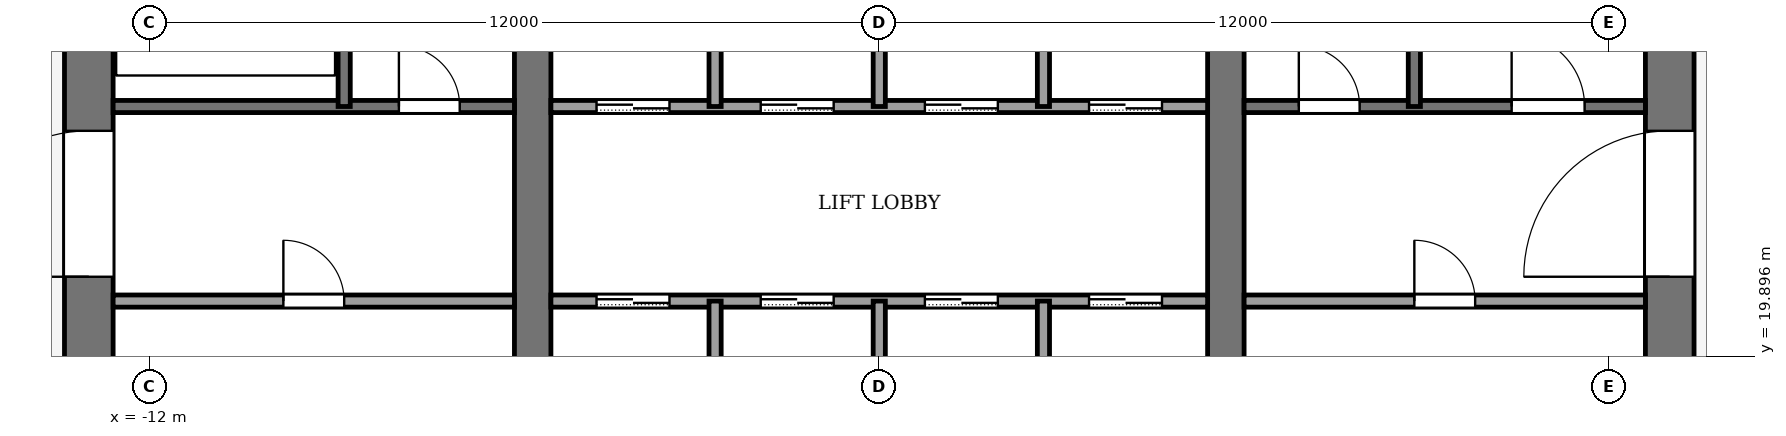
"""IFC4 building model, lengths in metres.
Left out: names, types, materials, properties, quantities, classifications, styles, units other than length and angle.
Written with IfcOpenShell. Run it as: python <this file> out.ifc"""

import sys

from ifc_helpers import new_model, si_unit, direction, frame, frame_2d, origin, place, context, subcontext, project, spatial, rectangle, extrude, element, fill, save


model = new_model("IFC4")
c1 = context("Model", 3, precision=1e-05, world=origin(), true_north=direction((0.0, 1.0)))
c2 = subcontext(c1, "Body", "Model", "MODEL_VIEW")
j1 = project(units=[si_unit("LENGTHUNIT", "METRE"), si_unit("PLANEANGLEUNIT", "RADIAN")], contexts=[c1])
p1 = place(None, origin())
s1 = spatial("IfcSite", under=j1, at=p1, CompositionType="ELEMENT")
p2 = place(p1, origin())
s2 = spatial("IfcBuilding", under=s1, at=p2, CompositionType="ELEMENT")
p3 = place(p2, frame((0.0, 0.0, 233.0)))
s3 = spatial("IfcBuildingStorey", under=s2, at=p3, CompositionType="ELEMENT", Elevation=233.0)
p4 = place(p3, frame((-13.0, 18.4, -0.13), z_axis=(0.0, 0.0, 1.0), x_axis=(0.0, 1.0, 0.0)))
e1 = element("IfcWall", 1, at=p4, inside=s3, PredefinedType="SHEAR", context=c2, shape_type="SweptSolid", body=[
    extrude(rectangle(XDim=19.2, YDim=0.8, at=frame_2d((9.6, 0.0))), origin(), (0.0, 0.0, 1.0), 5.0),
])
p5 = place(p4, frame((2.8, 0.0, 0.13)))
e2 = element("IfcOpeningElement", 2, at=p5, cuts=e1, PredefinedType="OPENING", context=c2, shape_type="SweptSolid", body=[
    extrude(rectangle(XDim=2.4, YDim=2.4, at=frame_2d((1.2, 1.2))), frame((0.0, 0.41, 0.0), z_axis=(0.0, -1.0, 0.0), x_axis=(1.0, 0.0, 0.0)), (0.0, 0.0, 1.0), 0.82),
])
p6 = place(p4, frame((13.4, 0.0, 0.13)))
e3 = element("IfcOpeningElement", 3, at=p6, cuts=e1, PredefinedType="OPENING", context=c2, shape_type="SweptSolid", body=[
    extrude(rectangle(XDim=1.4, YDim=2.2, at=frame_2d((0.7, 1.1))), frame((0.0, 0.41, 0.0), z_axis=(0.0, -1.0, 0.0), x_axis=(1.0, 0.0, 0.0)), (0.0, 0.0, 1.0), 0.82),
])
p7 = place(p3, frame((13.0, 18.4, -0.13), z_axis=(0.0, 0.0, 1.0), x_axis=(0.0, 1.0, 0.0)))
e4 = element("IfcWall", 4, at=p7, inside=s3, PredefinedType="SHEAR", context=c2, shape_type="SweptSolid", body=[
    extrude(rectangle(XDim=19.2, YDim=0.8, at=frame_2d((9.6, 0.0))), origin(), (0.0, 0.0, 1.0), 5.0),
])
p8 = place(p7, frame((2.8, 0.0, 0.13)))
e5 = element("IfcOpeningElement", 5, at=p8, cuts=e4, PredefinedType="OPENING", context=c2, shape_type="SweptSolid", body=[
    extrude(rectangle(XDim=2.4, YDim=2.4, at=frame_2d((1.2, 1.2))), frame((0.0, 0.41, 0.0), z_axis=(0.0, -1.0, 0.0), x_axis=(1.0, 0.0, 0.0)), (0.0, 0.0, 1.0), 0.82),
])
p9 = place(p7, frame((13.3, 0.0, 0.13)))
e6 = element("IfcOpeningElement", 6, at=p9, cuts=e4, PredefinedType="OPENING", context=c2, shape_type="SweptSolid", body=[
    extrude(rectangle(XDim=2.4, YDim=2.4, at=frame_2d((1.2, 1.2))), frame((0.0, 0.41, 0.0), z_axis=(0.0, -1.0, 0.0), x_axis=(1.0, 0.0, 0.0)), (0.0, 0.0, 1.0), 0.82),
])
p10 = place(p3, frame((-5.7, 18.4, -0.13), z_axis=(0.0, 0.0, 1.0), x_axis=(0.0, 1.0, 0.0)))
e7 = element("IfcWall", 7, at=p10, inside=s3, PredefinedType="SHEAR", context=c2, shape_type="SweptSolid", body=[
    extrude(rectangle(XDim=19.2, YDim=0.6, at=frame_2d((9.6, 0.0))), origin(), (0.0, 0.0, 1.0), 5.0),
])
p11 = place(p10, frame((8.35, 0.0, 0.13)))
e8 = element("IfcOpeningElement", 8, at=p11, cuts=e7, PredefinedType="OPENING", context=c2, shape_type="SweptSolid", body=[
    extrude(rectangle(XDim=0.9, YDim=2.1, at=frame_2d((0.45, 1.05))), frame((0.0, 0.31, 0.0), z_axis=(0.0, -1.0, 0.0), x_axis=(1.0, 0.0, 0.0)), (0.0, 0.0, 1.0), 0.62),
])
p12 = place(p3, frame((5.7, 18.4, -0.13), z_axis=(0.0, 0.0, 1.0), x_axis=(0.0, 1.0, 0.0)))
e9 = element("IfcWall", 9, at=p12, inside=s3, PredefinedType="SHEAR", context=c2, shape_type="SweptSolid", body=[
    extrude(rectangle(XDim=19.2, YDim=0.6, at=frame_2d((9.6, 0.0))), origin(), (0.0, 0.0, 1.0), 5.0),
])
p13 = place(p12, frame((13.3, 0.0, 0.13)))
e10 = element("IfcOpeningElement", 10, at=p13, cuts=e9, PredefinedType="OPENING", context=c2, shape_type="SweptSolid", body=[
    extrude(rectangle(XDim=2.4, YDim=2.4, at=frame_2d((1.2, 1.2))), frame((0.0, 0.31, 0.0), z_axis=(0.0, -1.0, 0.0), x_axis=(1.0, 0.0, 0.0)), (0.0, 0.0, 1.0), 0.62),
])
p14 = place(p3, frame((-12.6, 20.8, 0.0), z_axis=(0.0, 0.0, 1.0), x_axis=(1.0, 0.0, 0.0)))
e11 = element("IfcWall", 11, at=p14, inside=s3, PredefinedType="PARTITIONING", context=c2, shape_type="SweptSolid", body=[
    extrude(rectangle(XDim=6.6, YDim=0.2, at=frame_2d((3.3, 0.0))), origin(), (0.0, 0.0, 1.0), 4.87),
])
p15 = place(p14, frame((2.8, 0.0, 0.0)))
e12 = element("IfcOpeningElement", 12, at=p15, cuts=e11, PredefinedType="OPENING", context=c2, shape_type="SweptSolid", body=[
    extrude(rectangle(XDim=1.0, YDim=2.1, at=frame_2d((0.5, 1.05))), frame((0.0, 0.11, 0.0), z_axis=(0.0, -1.0, 0.0), x_axis=(1.0, 0.0, 0.0)), (0.0, 0.0, 1.0), 0.22),
])
p16 = place(p3, frame((-5.4, 20.8, 0.0), z_axis=(0.0, 0.0, 1.0), x_axis=(1.0, 0.0, 0.0)))
e13 = element("IfcWall", 13, at=p16, inside=s3, PredefinedType="PARTITIONING", context=c2, shape_type="SweptSolid", body=[
    extrude(rectangle(XDim=10.8, YDim=0.2, at=frame_2d((5.4, 0.0))), origin(), (0.0, 0.0, 1.0), 4.87),
])
p17 = place(p16, frame((0.75, 0.0, 0.0)))
e14 = element("IfcOpeningElement", 14, at=p17, cuts=e13, PredefinedType="OPENING", context=c2, shape_type="SweptSolid", body=[
    extrude(rectangle(XDim=1.2, YDim=2.2, at=frame_2d((0.6, 1.1))), frame((0.0, 0.11, 0.0), z_axis=(0.0, -1.0, 0.0), x_axis=(1.0, 0.0, 0.0)), (0.0, 0.0, 1.0), 0.22),
])
p18 = place(p16, frame((3.45, 0.0, 0.0)))
e15 = element("IfcOpeningElement", 15, at=p18, cuts=e13, PredefinedType="OPENING", context=c2, shape_type="SweptSolid", body=[
    extrude(rectangle(XDim=1.2, YDim=2.2, at=frame_2d((0.6, 1.1))), frame((0.0, 0.11, 0.0), z_axis=(0.0, -1.0, 0.0), x_axis=(1.0, 0.0, 0.0)), (0.0, 0.0, 1.0), 0.22),
])
p19 = place(p16, frame((6.15, 0.0, 0.0)))
e16 = element("IfcOpeningElement", 16, at=p19, cuts=e13, PredefinedType="OPENING", context=c2, shape_type="SweptSolid", body=[
    extrude(rectangle(XDim=1.2, YDim=2.2, at=frame_2d((0.6, 1.1))), frame((0.0, 0.11, 0.0), z_axis=(0.0, -1.0, 0.0), x_axis=(1.0, 0.0, 0.0)), (0.0, 0.0, 1.0), 0.22),
])
p20 = place(p16, frame((8.85, 0.0, 0.0)))
e17 = element("IfcOpeningElement", 17, at=p20, cuts=e13, PredefinedType="OPENING", context=c2, shape_type="SweptSolid", body=[
    extrude(rectangle(XDim=1.2, YDim=2.2, at=frame_2d((0.6, 1.1))), frame((0.0, 0.11, 0.0), z_axis=(0.0, -1.0, 0.0), x_axis=(1.0, 0.0, 0.0)), (0.0, 0.0, 1.0), 0.22),
])
p21 = place(p3, frame((6.0, 20.8, 0.0), z_axis=(0.0, 0.0, 1.0), x_axis=(1.0, 0.0, 0.0)))
e18 = element("IfcWall", 18, at=p21, inside=s3, PredefinedType="PARTITIONING", context=c2, shape_type="SweptSolid", body=[
    extrude(rectangle(XDim=6.6, YDim=0.2, at=frame_2d((3.3, 0.0))), origin(), (0.0, 0.0, 1.0), 4.87),
])
p22 = place(p21, frame((2.8, 0.0, 0.0)))
e19 = element("IfcOpeningElement", 19, at=p22, cuts=e18, PredefinedType="OPENING", context=c2, shape_type="SweptSolid", body=[
    extrude(rectangle(XDim=1.0, YDim=2.1, at=frame_2d((0.5, 1.05))), frame((0.0, 0.11, 0.0), z_axis=(0.0, -1.0, 0.0), x_axis=(1.0, 0.0, 0.0)), (0.0, 0.0, 1.0), 0.22),
])
p23 = place(p3, frame((-12.6, 24.0, 0.0), z_axis=(0.0, 0.0, 1.0), x_axis=(1.0, 0.0, 0.0)))
e20 = element("IfcWall", 20, at=p23, inside=s3, PredefinedType="PARTITIONING", context=c2, shape_type="SweptSolid", body=[
    extrude(rectangle(XDim=6.6, YDim=0.2, at=frame_2d((3.3, 0.0))), origin(), (0.0, 0.0, 1.0), 4.87),
])
p24 = place(p23, frame((4.7, 0.0, 0.0)))
e21 = element("IfcOpeningElement", 21, at=p24, cuts=e20, PredefinedType="OPENING", context=c2, shape_type="SweptSolid", body=[
    extrude(rectangle(XDim=1.0, YDim=2.1, at=frame_2d((0.5, 1.05))), frame((0.0, 0.11, 0.0), z_axis=(0.0, -1.0, 0.0), x_axis=(1.0, 0.0, 0.0)), (0.0, 0.0, 1.0), 0.22),
])
p25 = place(p3, frame((-5.4, 24.0, 0.0), z_axis=(0.0, 0.0, 1.0), x_axis=(1.0, 0.0, 0.0)))
e22 = element("IfcWall", 22, at=p25, inside=s3, PredefinedType="PARTITIONING", context=c2, shape_type="SweptSolid", body=[
    extrude(rectangle(XDim=10.8, YDim=0.2, at=frame_2d((5.4, 0.0))), origin(), (0.0, 0.0, 1.0), 4.87),
])
p26 = place(p25, frame((0.75, 0.0, 0.0)))
e23 = element("IfcOpeningElement", 23, at=p26, cuts=e22, PredefinedType="OPENING", context=c2, shape_type="SweptSolid", body=[
    extrude(rectangle(XDim=1.2, YDim=2.2, at=frame_2d((0.6, 1.1))), frame((0.0, 0.11, 0.0), z_axis=(0.0, -1.0, 0.0), x_axis=(1.0, 0.0, 0.0)), (0.0, 0.0, 1.0), 0.22),
])
p27 = place(p25, frame((3.45, 0.0, 0.0)))
e24 = element("IfcOpeningElement", 24, at=p27, cuts=e22, PredefinedType="OPENING", context=c2, shape_type="SweptSolid", body=[
    extrude(rectangle(XDim=1.2, YDim=2.2, at=frame_2d((0.6, 1.1))), frame((0.0, 0.11, 0.0), z_axis=(0.0, -1.0, 0.0), x_axis=(1.0, 0.0, 0.0)), (0.0, 0.0, 1.0), 0.22),
])
p28 = place(p25, frame((6.15, 0.0, 0.0)))
e25 = element("IfcOpeningElement", 25, at=p28, cuts=e22, PredefinedType="OPENING", context=c2, shape_type="SweptSolid", body=[
    extrude(rectangle(XDim=1.2, YDim=2.2, at=frame_2d((0.6, 1.1))), frame((0.0, 0.11, 0.0), z_axis=(0.0, -1.0, 0.0), x_axis=(1.0, 0.0, 0.0)), (0.0, 0.0, 1.0), 0.22),
])
p29 = place(p25, frame((8.85, 0.0, 0.0)))
e26 = element("IfcOpeningElement", 26, at=p29, cuts=e22, PredefinedType="OPENING", context=c2, shape_type="SweptSolid", body=[
    extrude(rectangle(XDim=1.2, YDim=2.2, at=frame_2d((0.6, 1.1))), frame((0.0, 0.11, 0.0), z_axis=(0.0, -1.0, 0.0), x_axis=(1.0, 0.0, 0.0)), (0.0, 0.0, 1.0), 0.22),
])
p30 = place(p3, frame((6.0, 24.0, 0.0), z_axis=(0.0, 0.0, 1.0), x_axis=(1.0, 0.0, 0.0)))
e27 = element("IfcWall", 27, at=p30, inside=s3, PredefinedType="PARTITIONING", context=c2, shape_type="SweptSolid", body=[
    extrude(rectangle(XDim=6.6, YDim=0.2, at=frame_2d((3.3, 0.0))), origin(), (0.0, 0.0, 1.0), 4.87),
])
p31 = place(p30, frame((0.9, 0.0, 0.0)))
e28 = element("IfcOpeningElement", 28, at=p31, cuts=e27, PredefinedType="OPENING", context=c2, shape_type="SweptSolid", body=[
    extrude(rectangle(XDim=1.0, YDim=2.1, at=frame_2d((0.5, 1.05))), frame((0.0, 0.11, 0.0), z_axis=(0.0, -1.0, 0.0), x_axis=(1.0, 0.0, 0.0)), (0.0, 0.0, 1.0), 0.22),
])
p32 = place(p30, frame((4.4, 0.0, 0.0)))
e29 = element("IfcOpeningElement", 29, at=p32, cuts=e27, PredefinedType="OPENING", context=c2, shape_type="SweptSolid", body=[
    extrude(rectangle(XDim=1.2, YDim=2.2, at=frame_2d((0.6, 1.1))), frame((0.0, 0.11, 0.0), z_axis=(0.0, -1.0, 0.0), x_axis=(1.0, 0.0, 0.0)), (0.0, 0.0, 1.0), 0.22),
])
p33 = place(p3, frame((-8.8, 24.0, 0.0), z_axis=(0.0, 0.0, 1.0), x_axis=(0.0, 1.0, 0.0)))
e30 = element("IfcWall", 30, at=p33, inside=s3, PredefinedType="PARTITIONING", context=c2, shape_type="SweptSolid", body=[
    extrude(rectangle(XDim=7.4, YDim=0.2, at=frame_2d((3.7, 0.0))), origin(), (0.0, 0.0, 1.0), 4.87),
])
p34 = place(p3, frame((-2.7, 18.4, 0.0), z_axis=(0.0, 0.0, 1.0), x_axis=(0.0, 1.0, 0.0)))
e31 = element("IfcWall", 31, at=p34, inside=s3, PredefinedType="PARTITIONING", context=c2, shape_type="SweptSolid", body=[
    extrude(rectangle(XDim=2.4, YDim=0.2, at=frame_2d((1.2, 0.0))), origin(), (0.0, 0.0, 1.0), 4.87),
])
p35 = place(p3, frame((-2.7, 24.0, 0.0), z_axis=(0.0, 0.0, 1.0), x_axis=(0.0, 1.0, 0.0)))
e32 = element("IfcWall", 32, at=p35, inside=s3, PredefinedType="PARTITIONING", context=c2, shape_type="SweptSolid", body=[
    extrude(rectangle(XDim=2.4, YDim=0.2, at=frame_2d((1.2, 0.0))), origin(), (0.0, 0.0, 1.0), 4.87),
])
p36 = place(p3, frame((0.0, 18.4, 0.0), z_axis=(0.0, 0.0, 1.0), x_axis=(0.0, 1.0, 0.0)))
e33 = element("IfcWall", 33, at=p36, inside=s3, PredefinedType="PARTITIONING", context=c2, shape_type="SweptSolid", body=[
    extrude(rectangle(XDim=2.4, YDim=0.2, at=frame_2d((1.2, 0.0))), origin(), (0.0, 0.0, 1.0), 4.87),
])
p37 = place(p3, frame((0.0, 24.0, 0.0), z_axis=(0.0, 0.0, 1.0), x_axis=(0.0, 1.0, 0.0)))
e34 = element("IfcWall", 34, at=p37, inside=s3, PredefinedType="PARTITIONING", context=c2, shape_type="SweptSolid", body=[
    extrude(rectangle(XDim=2.4, YDim=0.2, at=frame_2d((1.2, 0.0))), origin(), (0.0, 0.0, 1.0), 4.87),
])
p38 = place(p3, frame((2.7, 18.4, 0.0), z_axis=(0.0, 0.0, 1.0), x_axis=(0.0, 1.0, 0.0)))
e35 = element("IfcWall", 35, at=p38, inside=s3, PredefinedType="PARTITIONING", context=c2, shape_type="SweptSolid", body=[
    extrude(rectangle(XDim=2.4, YDim=0.2, at=frame_2d((1.2, 0.0))), origin(), (0.0, 0.0, 1.0), 4.87),
])
p39 = place(p3, frame((2.7, 24.0, 0.0), z_axis=(0.0, 0.0, 1.0), x_axis=(0.0, 1.0, 0.0)))
e36 = element("IfcWall", 36, at=p39, inside=s3, PredefinedType="PARTITIONING", context=c2, shape_type="SweptSolid", body=[
    extrude(rectangle(XDim=2.4, YDim=0.2, at=frame_2d((1.2, 0.0))), origin(), (0.0, 0.0, 1.0), 4.87),
])
p40 = place(p3, frame((8.8, 24.0, 0.0), z_axis=(0.0, 0.0, 1.0), x_axis=(0.0, 1.0, 0.0)))
e37 = element("IfcWall", 37, at=p40, inside=s3, PredefinedType="PARTITIONING", context=c2, shape_type="SweptSolid", body=[
    extrude(rectangle(XDim=7.4, YDim=0.2, at=frame_2d((3.7, 0.0))), origin(), (0.0, 0.0, 1.0), 4.87),
])
p41 = place(p17, origin())
e38 = element("IfcDoor", 38, at=p41, inside=s3, OperationType="SLIDING_TO_LEFT", PredefinedType="DOOR", context=c2, shape_type="SweptSolid", body=[
    extrude(rectangle(XDim=1.2, YDim=2.2, at=frame_2d((0.6, 1.1))), frame((0.0, 0.025, 0.0), z_axis=(0.0, -1.0, 0.0), x_axis=(1.0, 0.0, 0.0)), (0.0, 0.0, 1.0), 0.05),
])
fill(e14, e38)
p42 = place(p18, origin())
e39 = element("IfcDoor", 39, at=p42, inside=s3, OperationType="SLIDING_TO_LEFT", PredefinedType="DOOR", context=c2, shape_type="SweptSolid", body=[
    extrude(rectangle(XDim=1.2, YDim=2.2, at=frame_2d((0.6, 1.1))), frame((0.0, 0.025, 0.0), z_axis=(0.0, -1.0, 0.0), x_axis=(1.0, 0.0, 0.0)), (0.0, 0.0, 1.0), 0.05),
])
fill(e15, e39)
p43 = place(p19, origin())
e40 = element("IfcDoor", 40, at=p43, inside=s3, OperationType="SLIDING_TO_LEFT", PredefinedType="DOOR", context=c2, shape_type="SweptSolid", body=[
    extrude(rectangle(XDim=1.2, YDim=2.2, at=frame_2d((0.6, 1.1))), frame((0.0, 0.025, 0.0), z_axis=(0.0, -1.0, 0.0), x_axis=(1.0, 0.0, 0.0)), (0.0, 0.0, 1.0), 0.05),
])
fill(e16, e40)
p44 = place(p20, origin())
e41 = element("IfcDoor", 41, at=p44, inside=s3, OperationType="SLIDING_TO_LEFT", PredefinedType="DOOR", context=c2, shape_type="SweptSolid", body=[
    extrude(rectangle(XDim=1.2, YDim=2.2, at=frame_2d((0.6, 1.1))), frame((0.0, 0.025, 0.0), z_axis=(0.0, -1.0, 0.0), x_axis=(1.0, 0.0, 0.0)), (0.0, 0.0, 1.0), 0.05),
])
fill(e17, e41)
p45 = place(p26, origin())
e42 = element("IfcDoor", 42, at=p45, inside=s3, OperationType="SLIDING_TO_LEFT", PredefinedType="DOOR", context=c2, shape_type="SweptSolid", body=[
    extrude(rectangle(XDim=1.2, YDim=2.2, at=frame_2d((0.6, 1.1))), frame((0.0, 0.025, 0.0), z_axis=(0.0, -1.0, 0.0), x_axis=(1.0, 0.0, 0.0)), (0.0, 0.0, 1.0), 0.05),
])
fill(e23, e42)
p46 = place(p27, origin())
e43 = element("IfcDoor", 43, at=p46, inside=s3, OperationType="SLIDING_TO_LEFT", PredefinedType="DOOR", context=c2, shape_type="SweptSolid", body=[
    extrude(rectangle(XDim=1.2, YDim=2.2, at=frame_2d((0.6, 1.1))), frame((0.0, 0.025, 0.0), z_axis=(0.0, -1.0, 0.0), x_axis=(1.0, 0.0, 0.0)), (0.0, 0.0, 1.0), 0.05),
])
fill(e24, e43)
p47 = place(p28, origin())
e44 = element("IfcDoor", 44, at=p47, inside=s3, OperationType="SLIDING_TO_LEFT", PredefinedType="DOOR", context=c2, shape_type="SweptSolid", body=[
    extrude(rectangle(XDim=1.2, YDim=2.2, at=frame_2d((0.6, 1.1))), frame((0.0, 0.025, 0.0), z_axis=(0.0, -1.0, 0.0), x_axis=(1.0, 0.0, 0.0)), (0.0, 0.0, 1.0), 0.05),
])
fill(e25, e44)
p48 = place(p29, origin())
e45 = element("IfcDoor", 45, at=p48, inside=s3, OperationType="SLIDING_TO_LEFT", PredefinedType="DOOR", context=c2, shape_type="SweptSolid", body=[
    extrude(rectangle(XDim=1.2, YDim=2.2, at=frame_2d((0.6, 1.1))), frame((0.0, 0.025, 0.0), z_axis=(0.0, -1.0, 0.0), x_axis=(1.0, 0.0, 0.0)), (0.0, 0.0, 1.0), 0.05),
])
fill(e26, e45)
p49 = place(p15, origin())
e46 = element("IfcDoor", 46, at=p49, inside=s3, OperationType="SINGLE_SWING_LEFT", PredefinedType="DOOR", context=c2, shape_type="SweptSolid", body=[
    extrude(rectangle(XDim=1.0, YDim=2.1, at=frame_2d((0.5, 1.05))), frame((0.0, 0.025, 0.0), z_axis=(0.0, -1.0, 0.0), x_axis=(1.0, 0.0, 0.0)), (0.0, 0.0, 1.0), 0.05),
])
fill(e12, e46)
p50 = place(p22, origin())
e47 = element("IfcDoor", 47, at=p50, inside=s3, OperationType="SINGLE_SWING_RIGHT", PredefinedType="DOOR", context=c2, shape_type="SweptSolid", body=[
    extrude(rectangle(XDim=1.0, YDim=2.1, at=frame_2d((0.5, 1.05))), frame((0.0, 0.025, 0.0), z_axis=(0.0, -1.0, 0.0), x_axis=(1.0, 0.0, 0.0)), (0.0, 0.0, 1.0), 0.05),
])
fill(e19, e47)
p51 = place(p24, origin())
e48 = element("IfcDoor", 48, at=p51, inside=s3, OperationType="SINGLE_SWING_RIGHT", PredefinedType="DOOR", context=c2, shape_type="SweptSolid", body=[
    extrude(rectangle(XDim=1.0, YDim=2.1, at=frame_2d((0.5, 1.05))), frame((0.0, 0.025, 0.0), z_axis=(0.0, -1.0, 0.0), x_axis=(1.0, 0.0, 0.0)), (0.0, 0.0, 1.0), 0.05),
])
fill(e21, e48)
p52 = place(p31, origin())
e49 = element("IfcDoor", 49, at=p52, inside=s3, OperationType="SINGLE_SWING_LEFT", PredefinedType="DOOR", context=c2, shape_type="SweptSolid", body=[
    extrude(rectangle(XDim=1.0, YDim=2.1, at=frame_2d((0.5, 1.05))), frame((0.0, 0.025, 0.0), z_axis=(0.0, -1.0, 0.0), x_axis=(1.0, 0.0, 0.0)), (0.0, 0.0, 1.0), 0.05),
])
fill(e28, e49)
p53 = place(p32, origin())
e50 = element("IfcDoor", 50, at=p53, inside=s3, OperationType="SINGLE_SWING_LEFT", PredefinedType="DOOR", context=c2, shape_type="SweptSolid", body=[
    extrude(rectangle(XDim=1.2, YDim=2.2, at=frame_2d((0.6, 1.1))), frame((0.0, 0.025, 0.0), z_axis=(0.0, -1.0, 0.0), x_axis=(1.0, 0.0, 0.0)), (0.0, 0.0, 1.0), 0.05),
])
fill(e29, e50)
p54 = place(p5, origin())
e51 = element("IfcDoor", 51, at=p54, inside=s3, OperationType="DOUBLE_DOOR_SINGLE_SWING", PredefinedType="DOOR", context=c2, shape_type="SweptSolid", body=[
    extrude(rectangle(XDim=2.4, YDim=2.4, at=frame_2d((1.2, 1.2))), frame((0.0, 0.025, 0.0), z_axis=(0.0, -1.0, 0.0), x_axis=(1.0, 0.0, 0.0)), (0.0, 0.0, 1.0), 0.05),
])
fill(e2, e51)
p55 = place(p8, origin())
e52 = element("IfcDoor", 52, at=p55, inside=s3, OperationType="DOUBLE_DOOR_SINGLE_SWING", PredefinedType="DOOR", context=c2, shape_type="SweptSolid", body=[
    extrude(rectangle(XDim=2.4, YDim=2.4, at=frame_2d((1.2, 1.2))), frame((0.0, 0.025, 0.0), z_axis=(0.0, -1.0, 0.0), x_axis=(1.0, 0.0, 0.0)), (0.0, 0.0, 1.0), 0.05),
])
fill(e5, e52)
save(model, sys.argv[1])
